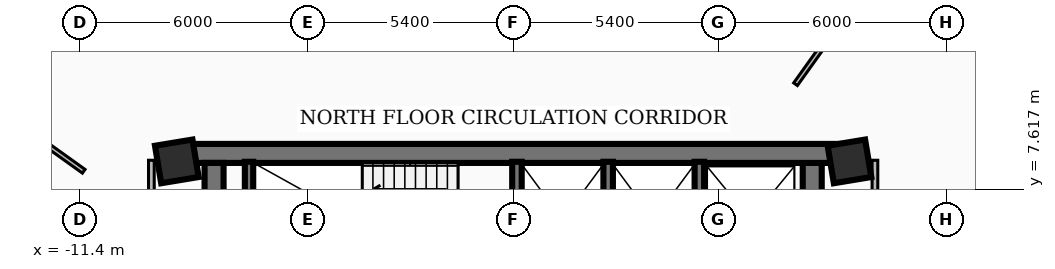
"""IFC4 building model, lengths in metres.
Left out: names, types, materials, properties, quantities, classifications, styles, units other than length and angle.
Written with IfcOpenShell. Run it as: python <this file> out.ifc"""

import sys

from ifc_helpers import new_model, si_unit, direction, frame, frame_2d, origin, origin_2d, place, context, subcontext, project, spatial, rectangle, extrude, element, save


model = new_model("IFC4")
c1 = context("Model", 3, precision=1e-05, world=origin(), true_north=direction((0.0, 1.0)))
c2 = subcontext(c1, "Body", "Model", "MODEL_VIEW")
j1 = project(units=[si_unit("LENGTHUNIT", "METRE"), si_unit("PLANEANGLEUNIT", "RADIAN")], contexts=[c1])
p1 = place(None, origin())
s1 = spatial("IfcSite", under=j1, at=p1, CompositionType="ELEMENT")
p2 = place(p1, origin())
s2 = spatial("IfcBuilding", under=s1, at=p2, CompositionType="ELEMENT")
p3 = place(p2, frame((0.0, 0.0, 96.48)))
s3 = spatial("IfcBuildingStorey", under=s2, at=p3, CompositionType="ELEMENT", Elevation=96.48)
p4 = place(p3, frame((-8.78, 8.56, 0.0), z_axis=(0.0, 0.0, 1.0), x_axis=(1.0, 0.0, 0.0)))
e1 = element("IfcWall", 1, at=p4, inside=s3, PredefinedType="SHEAR", context=c2, shape_type="SweptSolid", body=[
    extrude(rectangle(XDim=17.56, YDim=0.5, at=frame_2d((8.78, 0.0))), origin(), (0.0, 0.0, 1.0), 3.34),
])
for number, where, z_axis, x_axis in (
    (2, (-7.87, 2.0, 0.0), (0.0, 0.0, 1.0), (0.0, 1.0, 0.0)),
    (3, (7.87, 8.31, 0.0), (0.0, 0.0, 1.0), (0.0, -1.0, 0.0)),
):
    element("IfcWall", number, at=place(p3, frame(where, z_axis=z_axis, x_axis=x_axis)), inside=s3, PredefinedType="SHEAR", context=c2, shape_type="SweptSolid", body=[
        extrude(rectangle(XDim=6.31, YDim=0.5, at=frame_2d((3.155, 0.0))), origin(), (0.0, 0.0, 1.0), 3.34),
    ])
p5 = place(p3, frame((-6.95, 5.28, 0.0), z_axis=(0.0, 0.0, 1.0), x_axis=(0.0, 1.0, 0.0)))
e4 = element("IfcWall", 4, at=p5, inside=s3, PredefinedType="SOLIDWALL", context=c2, shape_type="SweptSolid", body=[
    extrude(rectangle(XDim=3.06, YDim=0.22, at=frame_2d((1.53, 0.0))), origin(), (0.0, 0.0, 1.0), 3.34),
])
for number, where, z_axis, x_axis in (
    (5, (0.1, 5.3, 0.0), (0.0, 0.0, 1.0), (0.0, 1.0, 0.0)),
    (6, (2.5, 5.3, 0.0), (0.0, 0.0, 1.0), (0.0, 1.0, 0.0)),
    (7, (4.9, 5.3, 0.0), (0.0, 0.0, 1.0), (0.0, 1.0, 0.0)),
):
    element("IfcWall", number, at=place(p3, frame(where, z_axis=z_axis, x_axis=x_axis)), inside=s3, PredefinedType="SOLIDWALL", context=c2, shape_type="SweptSolid", body=[
        extrude(rectangle(XDim=3.04, YDim=0.25, at=frame_2d((1.52, 0.0))), origin(), (0.0, 0.0, 1.0), 3.34),
    ])
for number, where, z_axis, x_axis in (
    (8, (-8.85, 8.35, 0.0), (0.0, 0.0, 1.0), (0.987, 0.163, 0.0)),
    (9, (8.85, 8.35, 0.0), (0.0, 0.0, 1.0), (0.987, 0.163, 0.0)),
):
    element("IfcColumn", number, at=place(p3, frame(where, z_axis=z_axis, x_axis=x_axis)), inside=s3, PredefinedType="COLUMN", context=c2, shape_type="SweptSolid", body=[
        extrude(rectangle(XDim=1.0, YDim=1.0, at=origin_2d()), origin(), (0.0, 0.0, 1.0), 3.6),
    ])
p6 = place(p3, frame((12.12, 15.142, 0.0), z_axis=(0.0, 0.0, 1.0), x_axis=(0.163241835244, -0.986586085056, 0.0)))
e10 = element("IfcWall", 10, at=p6, inside=s3, PredefinedType="SOLIDWALL", context=c2, shape_type="SweptSolid", body=[
    extrude(rectangle(XDim=6.775, YDim=0.24, at=frame_2d((3.387, 0.0))), origin(), (0.0, 0.0, 1.0), 3.34),
])
for number, where, z_axis, x_axis in (
    (11, (-9.52, 1.75, 0.0), (0.0, 0.0, 1.0), (0.0, 1.0, 0.0)),
    (12, (9.52, 1.75, 0.0), (0.0, 0.0, 1.0), (0.0, 1.0, 0.0)),
):
    element("IfcWall", number, at=place(p3, frame(where, z_axis=z_axis, x_axis=x_axis)), inside=s3, PredefinedType="PARTITIONING", context=c2, shape_type="SweptSolid", body=[
        extrude(rectangle(XDim=6.63, YDim=0.15, at=frame_2d((3.315, 0.0))), origin(), (0.0, 0.0, 1.0), 2.486),
    ])
p7 = place(p3, frame((7.431, 10.38, 0.0), z_axis=(0.0, 0.0, 1.0), x_axis=(0.582126278944, 0.813098392178, 0.0)))
e13 = element("IfcWall", 13, at=p7, inside=s3, PredefinedType="PARTITIONING", context=c2, shape_type="SweptSolid", body=[
    extrude(rectangle(XDim=6.889, YDim=0.12, at=frame_2d((3.444, 0.0))), origin(), (0.0, 0.0, 1.0), 2.486),
])
p8 = place(p3, frame((-11.3, 8.09, 0.0), z_axis=(0.0, 0.0, 1.0), x_axis=(-0.813131268368, 0.582080355623, 0.0)))
e14 = element("IfcWall", 14, at=p8, inside=s3, PredefinedType="PARTITIONING", context=c2, shape_type="SweptSolid", body=[
    extrude(rectangle(XDim=5.757, YDim=0.12, at=frame_2d((2.878, 0.0))), origin(), (0.0, 0.0, 1.0), 3.34),
])
save(model, sys.argv[1])
